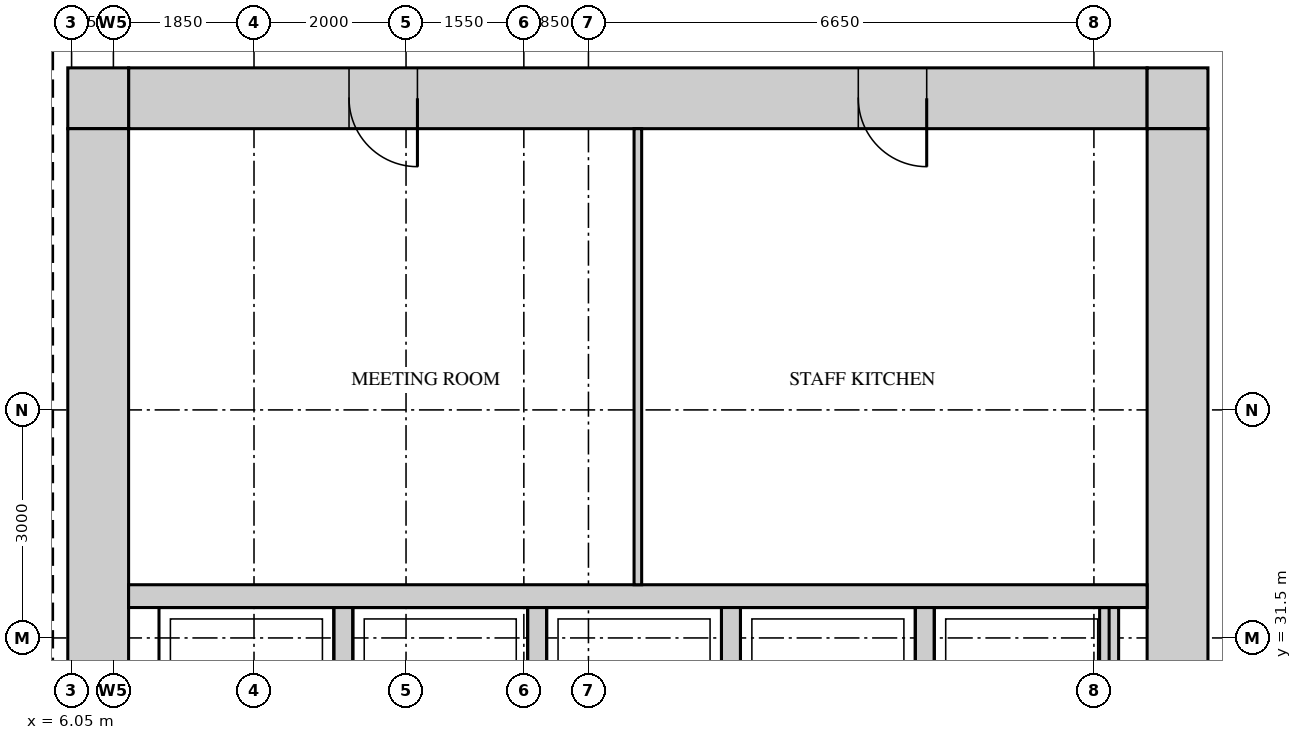
"""IFC4 building model, lengths in metres.
Left out: names, types, materials, properties, quantities, classifications, styles, units other than length and angle.
Written with IfcOpenShell. Run it as: python <this file> out.ifc"""

import sys

from ifc_helpers import new_model, si_unit, direction, frame, frame_2d, origin, place, context, subcontext, project, spatial, rectangle, extrude, source, transform, mapped, element, fill, save


model = new_model("IFC4")
c1 = context("Model", 3, precision=1e-05, world=origin(), true_north=direction((0.0, 1.0)))
c2 = subcontext(c1, "Body", "Model", "MODEL_VIEW")
j1 = project(units=[si_unit("LENGTHUNIT", "METRE"), si_unit("PLANEANGLEUNIT", "RADIAN")], contexts=[c1])
p1 = place(None, origin())
s1 = spatial("IfcSite", under=j1, at=p1, CompositionType="ELEMENT")
p2 = place(p1, origin())
s2 = spatial("IfcBuilding", under=s1, at=p2, CompositionType="ELEMENT")
p3 = place(p2, frame((0.0, 0.0, 168.7)))
s3 = spatial("IfcBuildingStorey", under=s2, at=p3, CompositionType="ELEMENT", Elevation=168.7)
m1 = source(origin(), c2, "Body", "SweptSolid", [
    extrude(rectangle(XDim=13.4, YDim=0.8, at=frame_2d((6.7, 0.0))), origin(), (0.0, 0.0, 1.0), 3.75),
])
p4 = place(p3, frame((6.8, 38.6, 0.0), z_axis=(0.0, 0.0, 1.0), x_axis=(1.0, 0.0, 0.0)))
e1 = element("IfcWall", 1, at=p4, inside=s3, PredefinedType="SHEAR", context=c2, shape_type="MappedRepresentation", body=[
    mapped(m1, transform((0.0, 0.0, 0.0))),
])
m2 = source(origin(), c2, "Body", "SweptSolid", [
    extrude(rectangle(XDim=0.9, YDim=2.1, at=frame_2d((0.45, 1.05))), frame((0.0, 0.41, 0.0), z_axis=(0.0, -1.0, 0.0), x_axis=(1.0, 0.0, 0.0)), (0.0, 0.0, 1.0), 0.82),
])
p5 = place(p4, frame((2.9, 0.0, 0.0)))
e2 = element("IfcOpeningElement", 2, at=p5, cuts=e1, PredefinedType="OPENING", context=c2, shape_type="MappedRepresentation", body=[
    mapped(m2, transform((0.0, 0.0, 0.0))),
])
p6 = place(p4, frame((9.6, 0.0, 0.0)))
e3 = element("IfcOpeningElement", 3, at=p6, cuts=e1, PredefinedType="OPENING", context=c2, shape_type="MappedRepresentation", body=[
    mapped(m2, transform((0.0, 0.0, 0.0))),
])
m3 = source(origin(), c2, "Body", "SweptSolid", [
    extrude(rectangle(XDim=0.8, YDim=0.8, at=frame_2d((0.4, 0.0))), origin(), (0.0, 0.0, 1.0), 3.75),
])
for number, where, z_axis, x_axis in (
    (4, (20.2, 38.6, 0.0), (0.0, 0.0, 1.0), (1.0, 0.0, 0.0)),
    (5, (6.0, 38.6, 0.0), (0.0, 0.0, 1.0), (1.0, 0.0, 0.0)),
):
    element("IfcWall", number, at=place(p3, frame(where, z_axis=z_axis, x_axis=x_axis)), inside=s3, PredefinedType="SHEAR", context=c2, shape_type="MappedRepresentation", body=[
        mapped(m3, transform((0.0, 0.0, 0.0))),
    ])
m4 = source(origin(), c2, "Body", "SweptSolid", [
    extrude(rectangle(XDim=22.4, YDim=0.8, at=frame_2d((11.2, 0.0))), origin(), (0.0, 0.0, 1.0), 3.75),
])
p7 = place(p3, frame((20.6, 15.8, 0.0), z_axis=(0.0, 0.0, 1.0), x_axis=(0.0, 1.0, 0.0)))
e6 = element("IfcWall", 6, at=p7, inside=s3, PredefinedType="SHEAR", context=c2, shape_type="MappedRepresentation", body=[
    mapped(m4, transform((0.0, 0.0, 0.0))),
])
m5 = source(origin(), c2, "Body", "SweptSolid", [
    extrude(rectangle(XDim=1.8, YDim=2.1, at=frame_2d((0.9, 1.05))), frame((0.0, 0.41, 0.0), z_axis=(0.0, -1.0, 0.0), x_axis=(1.0, 0.0, 0.0)), (0.0, 0.0, 1.0), 0.82),
])
p8 = place(p7, frame((10.7, 0.0, 0.0)))
e7 = element("IfcOpeningElement", 7, at=p8, cuts=e6, PredefinedType="OPENING", context=c2, shape_type="MappedRepresentation", body=[
    mapped(m5, transform((0.0, 0.0, 0.0))),
])
p9 = place(p7, frame((0.35, 0.0, 0.0)))
e8 = element("IfcOpeningElement", 8, at=p9, cuts=e6, PredefinedType="OPENING", context=c2, shape_type="MappedRepresentation", body=[
    mapped(m2, transform((0.0, 0.0, 0.0))),
])
p10 = place(p7, frame((2.8, 0.0, 0.0)))
e9 = element("IfcOpeningElement", 9, at=p10, cuts=e6, PredefinedType="OPENING", context=c2, shape_type="MappedRepresentation", body=[
    mapped(m2, transform((0.0, 0.0, 0.0))),
])
p11 = place(p7, frame((5.55, 0.0, 0.0)))
e10 = element("IfcOpeningElement", 10, at=p11, cuts=e6, PredefinedType="OPENING", context=c2, shape_type="MappedRepresentation", body=[
    mapped(m2, transform((0.0, 0.0, 0.0))),
])
p12 = place(p3, frame((6.4, 15.8, 0.0), z_axis=(0.0, 0.0, 1.0), x_axis=(0.0, 1.0, 0.0)))
e11 = element("IfcWall", 11, at=p12, inside=s3, PredefinedType="SHEAR", context=c2, shape_type="MappedRepresentation", body=[
    mapped(m4, transform((0.0, 0.0, 0.0))),
])
m6 = source(origin(), c2, "Body", "SweptSolid", [
    extrude(rectangle(XDim=13.4, YDim=0.3, at=frame_2d((6.7, 0.0))), origin(), (0.0, 0.0, 1.0), 3.75),
])
p13 = place(p3, frame((6.8, 32.05, 0.0), z_axis=(0.0, 0.0, 1.0), x_axis=(1.0, 0.0, 0.0)))
e12 = element("IfcWall", 12, at=p13, inside=s3, PredefinedType="STANDARD", context=c2, shape_type="MappedRepresentation", body=[
    mapped(m6, transform((0.0, 0.0, 0.0))),
])
m7 = source(origin(), c2, "Body", "SweptSolid", [
    extrude(rectangle(XDim=2.4, YDim=0.25, at=frame_2d((1.2, 0.0))), origin(), (0.0, 0.0, 1.0), 3.75),
])
for number, where, z_axis, x_axis in (
    (13, (17.275, 29.5, 0.0), (0.0, 0.0, 1.0), (0.0, 1.0, 0.0)),
    (14, (19.7, 29.5, 0.0), (0.0, 0.0, 1.0), (0.0, 1.0, 0.0)),
    (15, (9.625, 29.5, 0.0), (0.0, 0.0, 1.0), (0.0, 1.0, 0.0)),
    (16, (12.175, 29.5, 0.0), (0.0, 0.0, 1.0), (0.0, 1.0, 0.0)),
    (17, (14.725, 29.5, 0.0), (0.0, 0.0, 1.0), (0.0, 1.0, 0.0)),
):
    element("IfcWall", number, at=place(p3, frame(where, z_axis=z_axis, x_axis=x_axis)), inside=s3, PredefinedType="STANDARD", context=c2, shape_type="MappedRepresentation", body=[
        mapped(m7, transform((0.0, 0.0, 0.0))),
    ])
m8 = source(origin(), c2, "Body", "SweptSolid", [
    extrude(rectangle(XDim=6.0, YDim=0.1, at=frame_2d((3.0, 0.0))), origin(), (0.0, 0.0, 1.0), 3.8),
])
p14 = place(p3, frame((13.5, 32.2, 0.0), z_axis=(0.0, 0.0, 1.0), x_axis=(0.0, 1.0, 0.0)))
e18 = element("IfcWall", 18, at=p14, inside=s3, PredefinedType="PARTITIONING", context=c2, shape_type="MappedRepresentation", body=[
    mapped(m8, transform((0.0, 0.0, 0.0))),
])
m9 = source(origin(), c2, "Body", "SweptSolid", [
    extrude(rectangle(XDim=0.9, YDim=2.1, at=frame_2d((0.45, 1.05))), frame((0.0, 0.35, 0.0), z_axis=(0.0, -1.0, 0.0), x_axis=(1.0, 0.0, 0.0)), (0.0, 0.0, 1.0), 0.7),
])
p15 = place(p5, origin())
e19 = element("IfcDoor", 19, at=p15, inside=s3, OperationType="SINGLE_SWING_RIGHT", PredefinedType="DOOR", context=c2, shape_type="MappedRepresentation", body=[
    mapped(m9, transform((0.0, 0.0, 0.0))),
])
fill(e2, e19)
p16 = place(p6, origin())
e20 = element("IfcDoor", 20, at=p16, inside=s3, OperationType="SINGLE_SWING_RIGHT", PredefinedType="DOOR", context=c2, shape_type="MappedRepresentation", body=[
    mapped(m9, transform((0.0, 0.0, 0.0))),
])
fill(e3, e20)
save(model, sys.argv[1])
